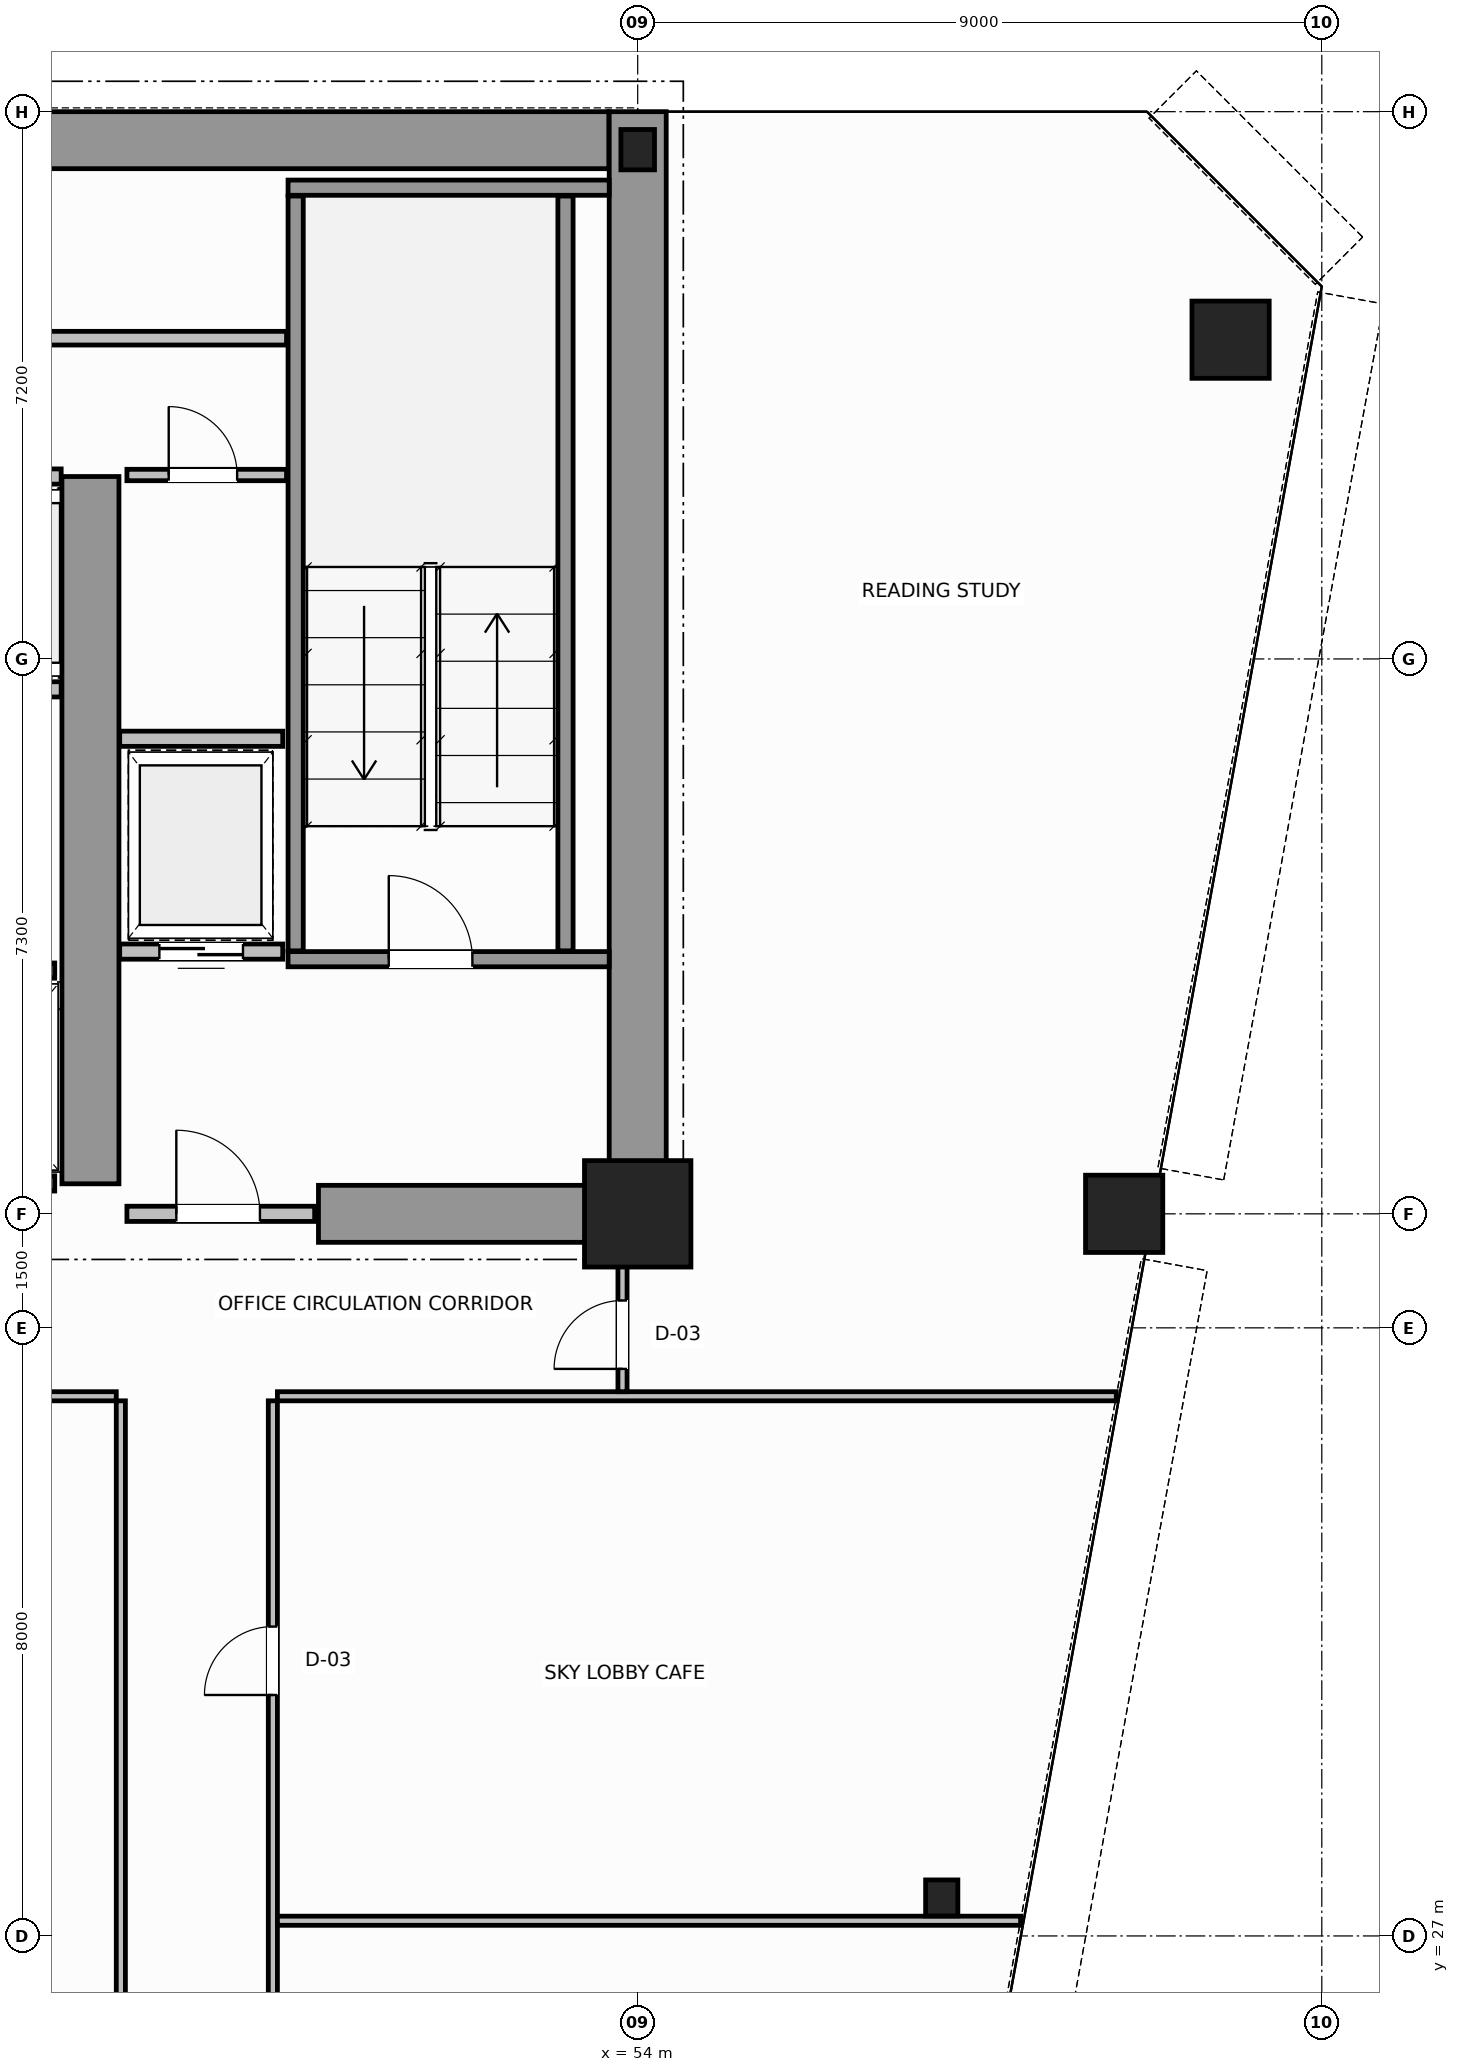
"""IFC4 building model, lengths in metres.
Left out: names, types, materials, properties, quantities, classifications, styles, units other than length and angle.
Written with IfcOpenShell. Run it as: python <this file> out.ifc"""

import sys

from ifc_helpers import new_model, si_unit, direction, frame, frame_2d, origin, origin_2d, place, context, subcontext, project, spatial, rectangle, hollow_circle, i_section, extrude, source, transform, mapped, element, fill, save


model = new_model("IFC4")
c1 = context("Model", 3, precision=1e-05, world=origin(), true_north=direction((0.0, 1.0)))
c2 = subcontext(c1, "Body", "Model", "MODEL_VIEW")
j1 = project(units=[si_unit("LENGTHUNIT", "METRE"), si_unit("PLANEANGLEUNIT", "RADIAN")], contexts=[c1])
p1 = place(None, origin())
s1 = spatial("IfcSite", under=j1, at=p1, CompositionType="ELEMENT")
p2 = place(p1, origin())
s2 = spatial("IfcBuilding", under=s1, at=p2, CompositionType="ELEMENT")
p3 = place(p2, frame((0.0, 0.0, 99.6)))
s3 = spatial("IfcBuildingStorey", under=s2, at=p3, CompositionType="ELEMENT", Elevation=99.6)
m1 = source(origin(), c2, "Body", "SweptSolid", [
    extrude(rectangle(XDim=1.4, YDim=1.4, at=origin_2d()), origin(), (0.0, 0.0, 1.0), 3.8),
])
p4 = place(p3, frame((54.0, 36.5, 0.0), z_axis=(0.0, 0.0, 1.0), x_axis=(1.0, 0.0, 0.0)))
e1 = element("IfcColumn", 1, at=p4, inside=s3, PredefinedType="COLUMN", context=c2, shape_type="MappedRepresentation", body=[
    mapped(m1, transform((0.0, 0.0, 0.0), scale=1.0)),
])
m2 = source(origin(), c2, "Body", "SweptSolid", [
    extrude(i_section(OverallWidth=0.442, OverallDepth=0.531, WebThickness=0.065, FlangeThickness=0.076, FilletRadius=0.015, at=origin_2d()), origin(), (0.0, 0.0, 1.0), 3.8),
])
p5 = place(p3, frame((54.0, 50.5, 0.0), z_axis=(0.0, 0.0, 1.0), x_axis=(1.0, 0.0, 0.0)))
e2 = element("IfcColumn", 2, at=p5, inside=s3, PredefinedType="COLUMN", context=c2, shape_type="MappedRepresentation", body=[
    mapped(m2, transform((0.0, 0.0, 0.0), scale=1.0)),
])
m3 = source(origin(), c2, "Body", "SweptSolid", [
    extrude(hollow_circle(Radius=0.508, WallThickness=0.045, at=origin_2d()), origin(), (0.0, 0.0, 1.0), 3.8),
])
for number, where, z_axis, x_axis in (
    (3, (61.8, 48.0, 0.0), (0.0, 0.0, 1.0), (1.0, 0.0, 0.0)),
    (4, (60.4, 36.5, 0.0), (0.0, 0.0, 1.0), (1.0, 0.0, 0.0)),
):
    element("IfcColumn", number, at=place(p3, frame(where, z_axis=z_axis, x_axis=x_axis)), inside=s3, PredefinedType="COLUMN", context=c2, shape_type="MappedRepresentation", body=[
        mapped(m3, transform((0.0, 0.0, 0.0), scale=1.0)),
    ])
m4 = source(origin(), c2, "Body", "SweptSolid", [
    extrude(i_section(OverallWidth=0.424, OverallDepth=0.474, WebThickness=0.047, FlangeThickness=0.065, FilletRadius=0.015, at=origin_2d()), origin(), (0.0, 0.0, 1.0), 3.8),
])
p6 = place(p3, frame((58.0, 27.5, 0.0), z_axis=(0.0, 0.0, 1.0), x_axis=(1.0, 0.0, 0.0)))
e5 = element("IfcColumn", 5, at=p6, inside=s3, PredefinedType="COLUMN", context=c2, shape_type="MappedRepresentation", body=[
    mapped(m4, transform((0.0, 0.0, 0.0), scale=1.0)),
])
p7 = place(p3, frame((34.002, 50.625, 0.0), z_axis=(0.0, 0.0, 1.0), x_axis=(1.0, 0.0, 0.0)))
e6 = element("IfcWall", 6, at=p7, inside=s3, PredefinedType="SHEAR", context=c2, shape_type="SweptSolid", body=[
    extrude(rectangle(XDim=19.619, YDim=0.75, at=frame_2d((9.81, 0.0))), origin(), (0.0, 0.0, 1.0), 3.8),
])
p8 = place(p3, frame((54.0, 36.5, 0.0), z_axis=(0.0, 0.0, 1.0), x_axis=(0.0, 1.0, 0.0)))
e7 = element("IfcWall", 7, at=p8, inside=s3, PredefinedType="SHEAR", context=c2, shape_type="SweptSolid", body=[
    extrude(rectangle(XDim=14.5, YDim=0.75, at=frame_2d((7.25, 0.0))), origin(), (0.0, 0.0, 1.0), 3.8),
])
p9 = place(p3, frame((49.8, 36.5, 0.0), z_axis=(0.0, 0.0, 1.0), x_axis=(1.0, 0.0, 0.0)))
e8 = element("IfcWall", 8, at=p9, inside=s3, PredefinedType="SHEAR", context=c2, shape_type="SweptSolid", body=[
    extrude(rectangle(XDim=3.805, YDim=0.75, at=frame_2d((1.902, 0.0))), origin(), (0.0, 0.0, 1.0), 2.38),
])
p10 = place(p3, frame((46.8, 36.895, 0.0), z_axis=(0.0, 0.0, 1.0), x_axis=(0.0, 1.0, 0.0)))
e9 = element("IfcWall", 9, at=p10, inside=s3, PredefinedType="SHEAR", context=c2, shape_type="SweptSolid", body=[
    extrude(rectangle(XDim=9.305, YDim=0.75, at=frame_2d((4.652, 0.0))), origin(), (0.0, 0.0, 1.0), 3.8),
])
p11 = place(p3, frame((49.4, 39.85, 0.0), z_axis=(0.0, 0.0, 1.0), x_axis=(1.0, 0.0, 0.0)))
e10 = element("IfcWall", 10, at=p11, inside=s3, PredefinedType="SOLIDWALL", context=c2, shape_type="SweptSolid", body=[
    extrude(rectangle(XDim=4.225, YDim=0.2, at=frame_2d((2.113, 0.0))), origin(), (0.0, 0.0, 1.0), 3.8),
])
p12 = place(p11, frame((1.325, 0.0, 0.0)))
e11 = element("IfcOpeningElement", 11, at=p12, cuts=e10, PredefinedType="OPENING", context=c2, shape_type="SweptSolid", body=[
    extrude(rectangle(XDim=1.1, YDim=2.15, at=frame_2d((0.55, 1.075))), frame((0.0, 0.11, 0.0), z_axis=(0.0, -1.0, 0.0), x_axis=(1.0, 0.0, 0.0)), (0.0, 0.0, 1.0), 0.22),
])
p13 = place(p3, frame((49.4, 50.0, 0.0), z_axis=(0.0, 0.0, 1.0), x_axis=(1.0, 0.0, 0.0)))
e12 = element("IfcWall", 12, at=p13, inside=s3, PredefinedType="SOLIDWALL", context=c2, shape_type="SweptSolid", body=[
    extrude(rectangle(XDim=4.225, YDim=0.2, at=frame_2d((2.113, 0.0))), origin(), (0.0, 0.0, 1.0), 3.8),
])
for number, where, z_axis, x_axis in (
    (13, (49.5, 39.96, 0.0), (0.0, 0.0, 1.0), (0.0, 1.0, 0.0)),
    (14, (53.05, 39.96, 0.0), (0.0, 0.0, 1.0), (0.0, 1.0, 0.0)),
):
    element("IfcWall", number, at=place(p3, frame(where, z_axis=z_axis, x_axis=x_axis)), inside=s3, PredefinedType="SOLIDWALL", context=c2, shape_type="SweptSolid", body=[
        extrude(rectangle(XDim=9.93, YDim=0.2, at=frame_2d((4.965, 0.0))), origin(), (0.0, 0.0, 1.0), 3.8),
    ])
p14 = place(p3, frame((47.28, 36.5, 0.0), z_axis=(0.0, 0.0, 1.0), x_axis=(1.0, 0.0, 0.0)))
e15 = element("IfcWall", 15, at=p14, inside=s3, PredefinedType="SOLIDWALL", context=c2, shape_type="SweptSolid", body=[
    extrude(rectangle(XDim=2.47, YDim=0.2, at=frame_2d((1.235, 0.0))), origin(), (0.0, 0.0, 1.0), 2.37),
])
p15 = place(p14, frame((0.65, 0.0, 0.0)))
e16 = element("IfcOpeningElement", 16, at=p15, cuts=e15, PredefinedType="OPENING", context=c2, shape_type="SweptSolid", body=[
    extrude(rectangle(XDim=1.1, YDim=2.15, at=frame_2d((0.55, 1.075))), frame((0.0, 0.11, 0.0), z_axis=(0.0, -1.0, 0.0), x_axis=(1.0, 0.0, 0.0)), (0.0, 0.0, 1.0), 0.22),
])
p16 = place(p3, frame((44.37, 39.7, 0.0), z_axis=(0.0, 0.0, 1.0), x_axis=(1.0, 0.0, 0.0)))
e17 = element("IfcWall", 17, at=p16, inside=s3, PredefinedType="SOLIDWALL", context=c2, shape_type="SweptSolid", body=[
    extrude(rectangle(XDim=1.96, YDim=0.2, at=frame_2d((0.98, 0.0))), origin(), (0.0, 0.0, 1.0), 3.58),
])
p17 = place(p16, frame((0.43, 0.0, 0.0)))
e18 = element("IfcOpeningElement", 18, at=p17, cuts=e17, PredefinedType="OPENING", context=c2, shape_type="SweptSolid", body=[
    extrude(rectangle(XDim=1.1, YDim=2.15, at=frame_2d((0.55, 1.075))), frame((0.0, 0.11, 0.0), z_axis=(0.0, -1.0, 0.0), x_axis=(1.0, 0.0, 0.0)), (0.0, 0.0, 1.0), 0.22),
])
p18 = place(p3, frame((44.37, 36.9, 0.0), z_axis=(0.0, 0.0, 1.0), x_axis=(1.0, 0.0, 0.0)))
e19 = element("IfcWall", 19, at=p18, inside=s3, PredefinedType="SOLIDWALL", context=c2, shape_type="SweptSolid", body=[
    extrude(rectangle(XDim=1.96, YDim=0.2, at=frame_2d((0.98, 0.0))), origin(), (0.0, 0.0, 1.0), 2.37),
])
p19 = place(p3, frame((44.62, 43.4, 0.0), z_axis=(0.0, 0.0, 1.0), x_axis=(1.0, 0.0, 0.0)))
e20 = element("IfcWall", 20, at=p19, inside=s3, PredefinedType="SOLIDWALL", context=c2, shape_type="SweptSolid", body=[
    extrude(rectangle(XDim=1.795, YDim=0.2, at=frame_2d((0.897, 0.0))), origin(), (0.0, 0.0, 1.0), 3.58),
])
p20 = place(p19, frame((0.348, 0.0, 0.0)))
e21 = element("IfcOpeningElement", 21, at=p20, cuts=e20, PredefinedType="OPENING", context=c2, shape_type="SweptSolid", body=[
    extrude(rectangle(XDim=1.1, YDim=2.15, at=frame_2d((0.55, 1.075))), frame((0.0, 0.11, 0.0), z_axis=(0.0, -1.0, 0.0), x_axis=(1.0, 0.0, 0.0)), (0.0, 0.0, 1.0), 0.22),
])
p21 = place(p3, frame((44.62, 46.2, 0.0), z_axis=(0.0, 0.0, 1.0), x_axis=(1.0, 0.0, 0.0)))
e22 = element("IfcWall", 22, at=p21, inside=s3, PredefinedType="SOLIDWALL", context=c2, shape_type="SweptSolid", body=[
    extrude(rectangle(XDim=1.795, YDim=0.2, at=frame_2d((0.897, 0.0))), origin(), (0.0, 0.0, 1.0), 3.58),
])
p22 = place(p3, frame((47.185, 39.95, 0.0), z_axis=(0.0, 0.0, 1.0), x_axis=(1.0, 0.0, 0.0)))
e23 = element("IfcWall", 23, at=p22, inside=s3, PredefinedType="SOLIDWALL", context=c2, shape_type="SweptSolid", body=[
    extrude(rectangle(XDim=2.145, YDim=0.2, at=frame_2d((1.073, 0.0))), origin(), (0.0, 0.0, 1.0), 3.58),
])
p23 = place(p22, frame((0.522, 0.0, 0.0)))
e24 = element("IfcOpeningElement", 24, at=p23, cuts=e23, PredefinedType="OPENING", context=c2, shape_type="SweptSolid", body=[
    extrude(rectangle(XDim=1.1, YDim=2.15, at=frame_2d((0.55, 1.075))), frame((0.0, 0.11, 0.0), z_axis=(0.0, -1.0, 0.0), x_axis=(1.0, 0.0, 0.0)), (0.0, 0.0, 1.0), 0.22),
])
p24 = place(p3, frame((47.185, 42.75, 0.0), z_axis=(0.0, 0.0, 1.0), x_axis=(1.0, 0.0, 0.0)))
e25 = element("IfcWall", 25, at=p24, inside=s3, PredefinedType="SOLIDWALL", context=c2, shape_type="SweptSolid", body=[
    extrude(rectangle(XDim=2.145, YDim=0.2, at=frame_2d((1.073, 0.0))), origin(), (0.0, 0.0, 1.0), 3.58),
])
p25 = place(p3, frame((47.28, 46.22, 0.0), z_axis=(0.0, 0.0, 1.0), x_axis=(1.0, 0.0, 0.0)))
e26 = element("IfcWall", 26, at=p25, inside=s3, PredefinedType="PARTITIONING", context=c2, shape_type="SweptSolid", body=[
    extrude(rectangle(XDim=2.1, YDim=0.15, at=frame_2d((1.05, 0.0))), origin(), (0.0, 0.0, 1.0), 3.58),
])
p26 = place(p25, frame((0.55, 0.0, 0.0)))
e27 = element("IfcOpeningElement", 27, at=p26, cuts=e26, PredefinedType="OPENING", context=c2, shape_type="SweptSolid", body=[
    extrude(rectangle(XDim=0.9, YDim=2.1, at=frame_2d((0.45, 1.05))), frame((0.0, 0.085, 0.0), z_axis=(0.0, -1.0, 0.0), x_axis=(1.0, 0.0, 0.0)), (0.0, 0.0, 1.0), 0.17),
])
p27 = place(p3, frame((18.62, 48.02, 0.0), z_axis=(0.0, 0.0, 1.0), x_axis=(1.0, 0.0, 0.0)))
e28 = element("IfcWall", 28, at=p27, inside=s3, PredefinedType="PLUMBINGWALL", context=c2, shape_type="SweptSolid", body=[
    extrude(rectangle(XDim=30.76, YDim=0.18, at=frame_2d((15.38, 0.0))), origin(), (0.0, 0.0, 1.0), 3.58),
])
p28 = place(p27, frame((1.955, 0.0, 0.0)))
e29 = element("IfcOpeningElement", 29, at=p28, cuts=e28, PredefinedType="OPENING", context=c2, shape_type="SweptSolid", body=[
    extrude(rectangle(XDim=0.9, YDim=2.15, at=frame_2d((0.45, 1.075))), frame((0.0, 0.1, 0.0), z_axis=(0.0, -1.0, 0.0), x_axis=(1.0, 0.0, 0.0)), (0.0, 0.0, 1.0), 0.2),
])
p29 = place(p27, frame((8.03, 0.0, 0.0)))
e30 = element("IfcOpeningElement", 30, at=p29, cuts=e28, PredefinedType="OPENING", context=c2, shape_type="SweptSolid", body=[
    extrude(rectangle(XDim=0.9, YDim=2.15, at=frame_2d((0.45, 1.075))), frame((0.0, 0.1, 0.0), z_axis=(0.0, -1.0, 0.0), x_axis=(1.0, 0.0, 0.0)), (0.0, 0.0, 1.0), 0.2),
])
p30 = place(p27, frame((16.93, 0.0, 0.0)))
e31 = element("IfcOpeningElement", 31, at=p30, cuts=e28, PredefinedType="OPENING", context=c2, shape_type="SweptSolid", body=[
    extrude(rectangle(XDim=0.9, YDim=2.15, at=frame_2d((0.45, 1.075))), frame((0.0, 0.1, 0.0), z_axis=(0.0, -1.0, 0.0), x_axis=(1.0, 0.0, 0.0)), (0.0, 0.0, 1.0), 0.2),
])
p31 = place(p27, frame((26.205, 0.0, 0.0)))
e32 = element("IfcOpeningElement", 32, at=p31, cuts=e28, PredefinedType="OPENING", context=c2, shape_type="SweptSolid", body=[
    extrude(rectangle(XDim=0.9, YDim=2.15, at=frame_2d((0.45, 1.075))), frame((0.0, 0.1, 0.0), z_axis=(0.0, -1.0, 0.0), x_axis=(1.0, 0.0, 0.0)), (0.0, 0.0, 1.0), 0.2),
])
p32 = place(p3, frame((20.86, 34.1, 0.0), z_axis=(0.0, 0.0, 1.0), x_axis=(1.0, 0.0, 0.0)))
e33 = element("IfcWall", 33, at=p32, inside=s3, PredefinedType="PARTITIONING", context=c2, shape_type="SweptSolid", body=[
    extrude(rectangle(XDim=26.28, YDim=0.12, at=frame_2d((13.14, 0.0))), origin(), (0.0, 0.0, 1.0), 3.58),
])
p33 = place(p32, frame((6.09, 0.0, 0.0)))
e34 = element("IfcOpeningElement", 34, at=p33, cuts=e33, PredefinedType="OPENING", context=c2, shape_type="SweptSolid", body=[
    extrude(rectangle(XDim=0.9, YDim=2.15, at=frame_2d((0.45, 1.075))), frame((0.0, 0.07, 0.0), z_axis=(0.0, -1.0, 0.0), x_axis=(1.0, 0.0, 0.0)), (0.0, 0.0, 1.0), 0.14),
])
p34 = place(p32, frame((19.29, 0.0, 0.0)))
e35 = element("IfcOpeningElement", 35, at=p34, cuts=e33, PredefinedType="OPENING", context=c2, shape_type="SweptSolid", body=[
    extrude(rectangle(XDim=0.9, YDim=2.15, at=frame_2d((0.45, 1.075))), frame((0.0, 0.07, 0.0), z_axis=(0.0, -1.0, 0.0), x_axis=(1.0, 0.0, 0.0)), (0.0, 0.0, 1.0), 0.14),
])
p35 = place(p3, frame((49.26, 34.1, 0.0), z_axis=(0.0, 0.0, 1.0), x_axis=(1.0, 0.0, 0.0)))
e36 = element("IfcWall", 36, at=p35, inside=s3, PredefinedType="PARTITIONING", context=c2, shape_type="SweptSolid", body=[
    extrude(rectangle(XDim=11.036, YDim=0.12, at=frame_2d((5.518, 0.0))), origin(), (0.0, 0.0, 1.0), 3.58),
])
p36 = place(p3, frame((53.8, 34.16, 0.0), z_axis=(0.0, 0.0, 1.0), x_axis=(0.0, 1.0, 0.0)))
e37 = element("IfcWall", 37, at=p36, inside=s3, PredefinedType="PARTITIONING", context=c2, shape_type="SweptSolid", body=[
    extrude(rectangle(XDim=2.28, YDim=0.12, at=frame_2d((1.14, 0.0))), origin(), (0.0, 0.0, 1.0), 3.58),
])
p37 = place(p36, frame((0.3, 0.0, 0.0)))
e38 = element("IfcOpeningElement", 38, at=p37, cuts=e37, PredefinedType="OPENING", context=c2, shape_type="SweptSolid", body=[
    extrude(rectangle(XDim=0.9, YDim=2.15, at=frame_2d((0.45, 1.075))), frame((0.0, 0.07, 0.0), z_axis=(0.0, -1.0, 0.0), x_axis=(1.0, 0.0, 0.0)), (0.0, 0.0, 1.0), 0.14),
])
p38 = place(p3, frame((47.2, 15.6, 0.0), z_axis=(0.0, 0.0, 1.0), x_axis=(0.0, 1.0, 0.0)))
e39 = element("IfcWall", 39, at=p38, inside=s3, PredefinedType="PARTITIONING", context=c2, shape_type="SweptSolid", body=[
    extrude(rectangle(XDim=18.44, YDim=0.12, at=frame_2d((9.22, 0.0))), origin(), (0.0, 0.0, 1.0), 3.58),
])
p39 = place(p3, frame((49.2, 15.6, 0.0), z_axis=(0.0, 0.0, 1.0), x_axis=(0.0, 1.0, 0.0)))
e40 = element("IfcWall", 40, at=p39, inside=s3, PredefinedType="PARTITIONING", context=c2, shape_type="SweptSolid", body=[
    extrude(rectangle(XDim=18.44, YDim=0.12, at=frame_2d((9.22, 0.0))), origin(), (0.0, 0.0, 1.0), 3.58),
])
p40 = place(p39, frame((5.35, 0.0, 0.0)))
e41 = element("IfcOpeningElement", 41, at=p40, cuts=e40, PredefinedType="OPENING", context=c2, shape_type="SweptSolid", body=[
    extrude(rectangle(XDim=0.9, YDim=2.15, at=frame_2d((0.45, 1.075))), frame((0.0, 0.07, 0.0), z_axis=(0.0, -1.0, 0.0), x_axis=(1.0, 0.0, 0.0)), (0.0, 0.0, 1.0), 0.14),
])
p41 = place(p39, frame((14.57, 0.0, 0.0)))
e42 = element("IfcOpeningElement", 42, at=p41, cuts=e40, PredefinedType="OPENING", context=c2, shape_type="SweptSolid", body=[
    extrude(rectangle(XDim=0.9, YDim=2.15, at=frame_2d((0.45, 1.075))), frame((0.0, 0.07, 0.0), z_axis=(0.0, -1.0, 0.0), x_axis=(1.0, 0.0, 0.0)), (0.0, 0.0, 1.0), 0.14),
])
p42 = place(p3, frame((49.26, 27.2, 0.0), z_axis=(0.0, 0.0, 1.0), x_axis=(1.0, 0.0, 0.0)))
e43 = element("IfcWall", 43, at=p42, inside=s3, PredefinedType="PARTITIONING", context=c2, shape_type="SweptSolid", body=[
    extrude(rectangle(XDim=9.778, YDim=0.12, at=frame_2d((4.889, 0.0))), origin(), (0.0, 0.0, 1.0), 3.58),
])
m5 = source(origin(), c2, "Body", "SweptSolid", [
    extrude(rectangle(XDim=1.1, YDim=2.15, at=frame_2d((0.55, 1.075))), frame((0.0, 0.025, 0.0), z_axis=(0.0, -1.0, 0.0), x_axis=(1.0, 0.0, 0.0)), (0.0, 0.0, 1.0), 0.05),
])
p43 = place(p12, origin())
e44 = element("IfcDoor", 44, at=p43, inside=s3, OperationType="SINGLE_SWING_RIGHT", PredefinedType="DOOR", context=c2, shape_type="MappedRepresentation", body=[
    mapped(m5, transform((0.0, 0.0, 0.0), scale=1.0)),
])
fill(e11, e44)
p44 = place(p15, origin())
e45 = element("IfcDoor", 45, at=p44, inside=s3, OperationType="SINGLE_SWING_LEFT", PredefinedType="DOOR", context=c2, shape_type="MappedRepresentation", body=[
    mapped(m5, transform((0.0, 0.0, 0.0), scale=1.0)),
])
fill(e16, e45)
p45 = place(p23, origin())
e46 = element("IfcDoor", 46, at=p45, inside=s3, OperationType="DOUBLE_DOOR_SLIDING", PredefinedType="DOOR", context=c2, shape_type="MappedRepresentation", body=[
    mapped(m5, transform((0.0, 0.0, 0.0), scale=1.0)),
])
fill(e24, e46)
m6 = source(origin(), c2, "Body", "SweptSolid", [
    extrude(rectangle(XDim=0.9, YDim=2.1, at=frame_2d((0.45, 1.05))), frame((0.0, 0.025, 0.0), z_axis=(0.0, -1.0, 0.0), x_axis=(1.0, 0.0, 0.0)), (0.0, 0.0, 1.0), 0.05),
])
p46 = place(p26, origin())
e47 = element("IfcDoor", 47, at=p46, inside=s3, OperationType="SINGLE_SWING_RIGHT", PredefinedType="DOOR", context=c2, shape_type="MappedRepresentation", body=[
    mapped(m6, transform((0.0, 0.0, 0.0), scale=1.0)),
])
fill(e27, e47)
m7 = source(origin(), c2, "Body", "SweptSolid", [
    extrude(rectangle(XDim=0.9, YDim=2.15, at=frame_2d((0.45, 1.075))), frame((0.0, 0.025, 0.0), z_axis=(0.0, -1.0, 0.0), x_axis=(1.0, 0.0, 0.0)), (0.0, 0.0, 1.0), 0.05),
])
p47 = place(p37, origin())
e48 = element("IfcDoor", 48, at=p47, inside=s3, OperationType="SINGLE_SWING_RIGHT", PredefinedType="DOOR", context=c2, shape_type="MappedRepresentation", body=[
    mapped(m7, transform((0.0, 0.0, 0.0), scale=1.0)),
])
fill(e38, e48)
p48 = place(p41, origin())
e49 = element("IfcDoor", 49, at=p48, inside=s3, OperationType="SINGLE_SWING_LEFT", PredefinedType="DOOR", context=c2, shape_type="MappedRepresentation", body=[
    mapped(m7, transform((0.0, 0.0, 0.0), scale=1.0)),
])
fill(e42, e49)
save(model, sys.argv[1])
